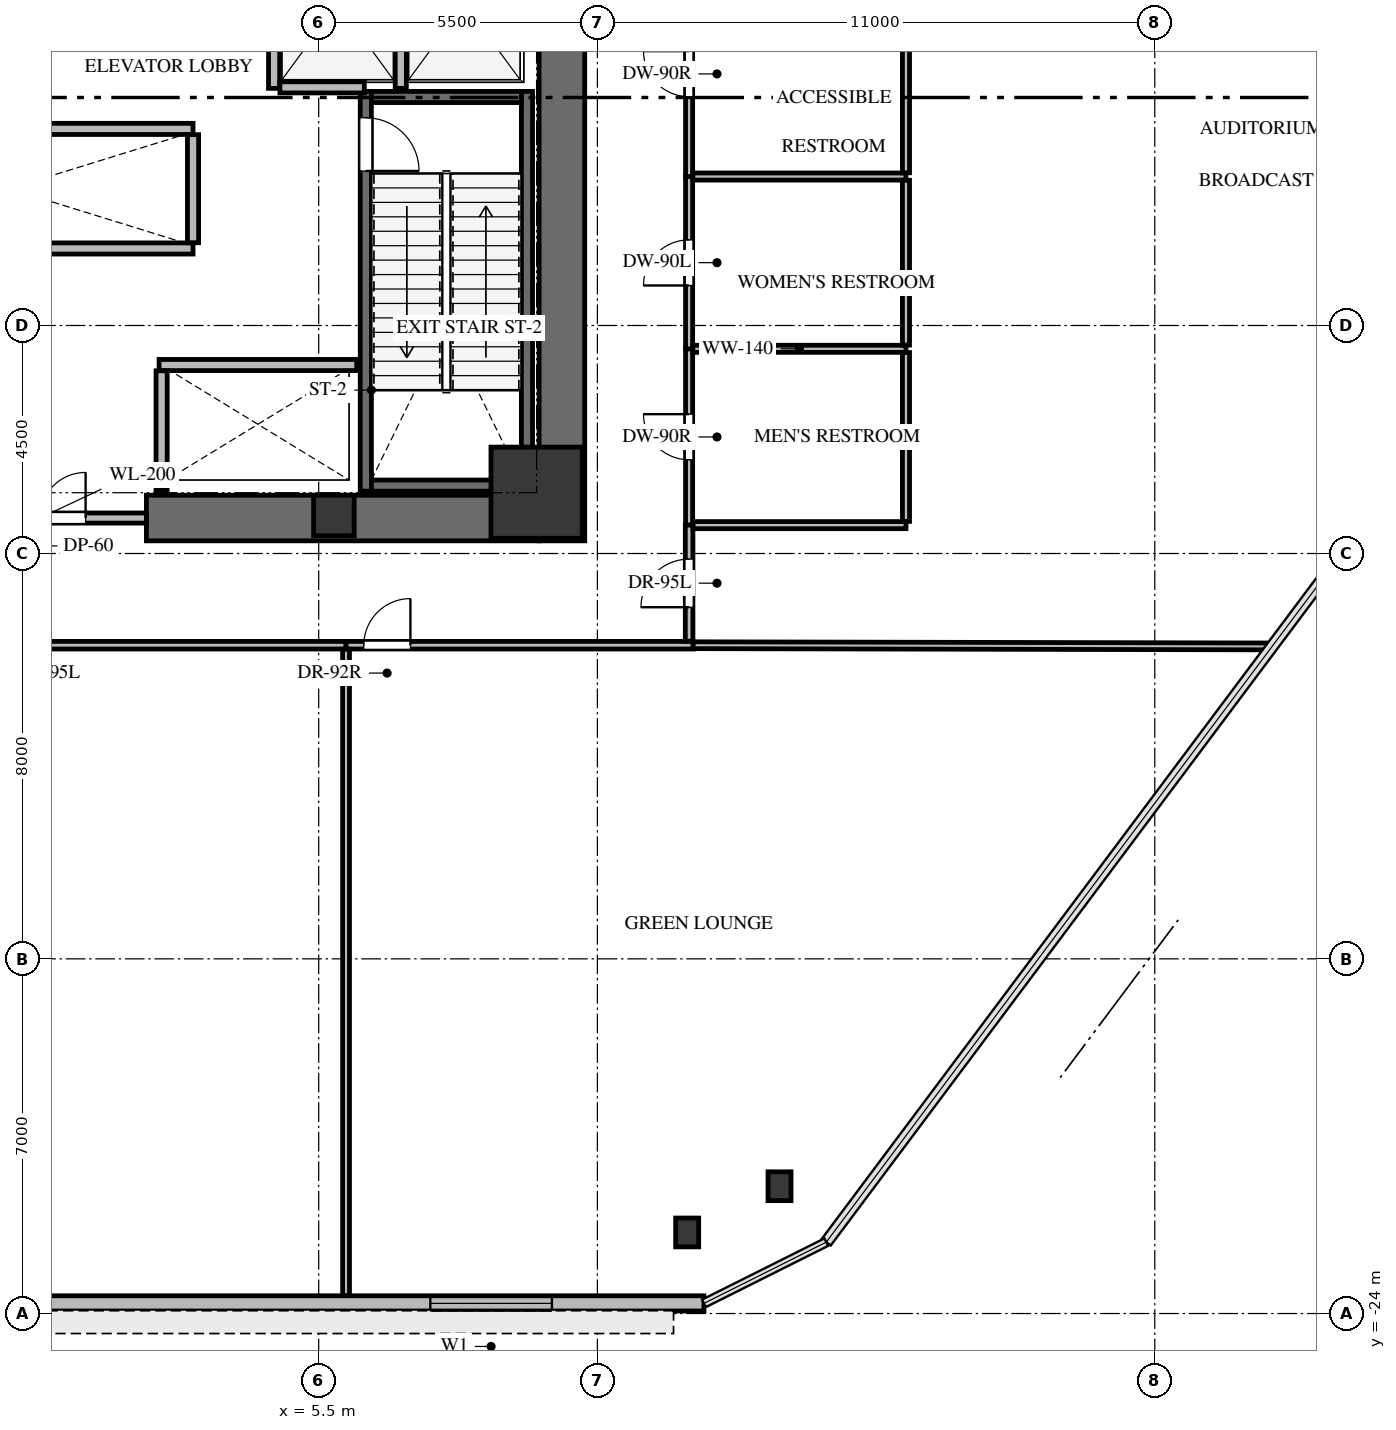
"""IFC4 building model, lengths in metres.
Left out: names, types, materials, properties, quantities, classifications, styles, units other than length and angle.
Written with IfcOpenShell. Run it as: python <this file> out.ifc"""

import sys

from ifc_helpers import new_model, si_unit, direction, frame, frame_2d, origin, origin_2d, place, context, subcontext, project, spatial, rectangle, i_section, extrude, source, transform, mapped, element, fill, save


model = new_model("IFC4")
c1 = context("Model", 3, precision=1e-05, world=origin(), true_north=direction((0.0, 1.0)))
c2 = subcontext(c1, "Body", "Model", "MODEL_VIEW")
j1 = project(units=[si_unit("LENGTHUNIT", "METRE"), si_unit("PLANEANGLEUNIT", "RADIAN")], contexts=[c1])
p1 = place(None, origin())
s1 = spatial("IfcSite", under=j1, at=p1, CompositionType="ELEMENT")
p2 = place(p1, origin())
s2 = spatial("IfcBuilding", under=s1, at=p2, CompositionType="ELEMENT")
p3 = place(p2, frame((0.0, 0.0, 15.6)))
s3 = spatial("IfcBuildingStorey", under=s2, at=p3, CompositionType="ELEMENT", Elevation=15.6)
p4 = place(p3, frame((10.3, -8.75, 0.0), z_axis=(0.0, 0.0, 1.0), x_axis=(0.0, 1.0, 0.0)))
e1 = element("IfcWall", 1, at=p4, inside=s3, PredefinedType="SHEAR", context=c2, shape_type="SweptSolid", body=[
    extrude(rectangle(XDim=17.5, YDim=0.9, at=frame_2d((8.75, 0.0))), origin(), (0.0, 0.0, 1.0), 5.6),
])
p5 = place(p3, frame((2.1, -8.3, 0.0), z_axis=(0.0, 0.0, 1.0), x_axis=(1.0, 0.0, 0.0)))
e2 = element("IfcWall", 2, at=p5, inside=s3, PredefinedType="SHEAR", context=c2, shape_type="SweptSolid", body=[
    extrude(rectangle(XDim=7.75, YDim=0.9, at=frame_2d((3.875, 0.0))), origin(), (0.0, 0.0, 1.0), 5.6),
])
p6 = place(p3, frame((9.61, -7.77, -0.32), z_axis=(0.0, 0.0, 1.0), x_axis=(0.0, 1.0, 0.0)))
e3 = element("IfcWall", 3, at=p6, inside=s3, PredefinedType="SHEAR", context=c2, shape_type="SweptSolid", body=[
    extrude(rectangle(XDim=7.89, YDim=0.22, at=frame_2d((3.945, 0.0))), origin(), (0.0, 0.0, 1.0), 5.6),
])
p7 = place(p3, frame((6.43, 0.12, -0.32), z_axis=(0.0, 0.0, 1.0), x_axis=(0.0, -1.0, 0.0)))
e4 = element("IfcWall", 4, at=p7, inside=s3, PredefinedType="SHEAR", context=c2, shape_type="SweptSolid", body=[
    extrude(rectangle(XDim=7.89, YDim=0.22, at=frame_2d((3.945, 0.0))), origin(), (0.0, 0.0, 1.0), 5.6),
])
p8 = place(p7, frame((0.52, 0.0, 0.0)))
e5 = element("IfcOpeningElement", 5, at=p8, cuts=e4, PredefinedType="OPENING", context=c2, shape_type="SweptSolid", body=[
    extrude(rectangle(XDim=1.05, YDim=2.15, at=frame_2d((0.525, 1.075))), frame((0.0, 0.12, 0.0), z_axis=(0.0, -1.0, 0.0), x_axis=(1.0, 0.0, 0.0)), (0.0, 0.0, 1.0), 0.24),
])
for number, where, z_axis, x_axis in (
    (6, (6.54, -7.66, -0.32), (0.0, 0.0, 1.0), (1.0, 0.0, 0.0)),
    (7, (9.5, 0.01, -0.32), (0.0, 0.0, 1.0), (-1.0, 0.0, 0.0)),
):
    element("IfcWall", number, at=place(p3, frame(where, z_axis=z_axis, x_axis=x_axis)), inside=s3, PredefinedType="SHEAR", context=c2, shape_type="SweptSolid", body=[
        extrude(rectangle(XDim=2.96, YDim=0.22, at=frame_2d((1.48, 0.0))), origin(), (0.0, 0.0, 1.0), 5.6),
    ])
m1 = source(origin(), c2, "Body", "SweptSolid", [
    extrude(rectangle(XDim=1.8, YDim=1.8, at=origin_2d()), origin(), (0.0, 0.0, 1.0), 5.6),
])
p9 = place(p3, frame((9.8, -7.8, -0.32), z_axis=(0.0, 0.0, 1.0), x_axis=(1.0, 0.0, 0.0)))
e8 = element("IfcColumn", 8, at=p9, inside=s3, PredefinedType="COLUMN", context=c2, shape_type="MappedRepresentation", body=[
    mapped(m1, transform((0.0, 0.0, 0.0), x_axis=(1.0, 0.0, 0.0), y_axis=(0.0, 1.0, 0.0), z_axis=(0.0, 0.0, 1.0), scale=1.0)),
])
m2 = source(origin(), c2, "Body", "SweptSolid", [
    extrude(rectangle(XDim=0.8, YDim=0.8, at=origin_2d()), origin(), (0.0, 0.0, 1.0), 5.6),
])
p10 = place(p3, frame((5.8, -8.25, -0.32), z_axis=(0.0, 0.0, 1.0), x_axis=(1.0, 0.0, 0.0)))
e9 = element("IfcColumn", 9, at=p10, inside=s3, PredefinedType="PILASTER", context=c2, shape_type="MappedRepresentation", body=[
    mapped(m2, transform((0.0, 0.0, 0.0), x_axis=(1.0, 0.0, 0.0), y_axis=(0.0, 1.0, 0.0), z_axis=(0.0, 0.0, 1.0), scale=1.0)),
])
m3 = source(origin(), c2, "Body", "SweptSolid", [
    extrude(i_section(OverallWidth=0.454, OverallDepth=0.569, WebThickness=0.078, FlangeThickness=0.125, FilletRadius=0.031, at=origin_2d()), origin(), (0.0, 0.0, 1.0), 5.6),
])
for number, where, z_axis, x_axis in (
    (10, (14.594, -21.488, -0.32), (0.0, 0.0, 1.0), (1.0, 0.0, 0.0)),
    (11, (12.772, -22.4, -0.32), (0.0, 0.0, 1.0), (1.0, 0.0, 0.0)),
):
    element("IfcColumn", number, at=place(p3, frame(where, z_axis=z_axis, x_axis=x_axis)), inside=s3, PredefinedType="COLUMN", context=c2, shape_type="MappedRepresentation", body=[
        mapped(m3, transform((0.0, 0.0, 0.0), x_axis=(1.0, 0.0, 0.0), y_axis=(0.0, 1.0, 0.0), z_axis=(0.0, 0.0, 1.0), scale=1.0)),
    ])
p11 = place(p3, frame((13.103, -23.8, 0.0), z_axis=(0.0, 0.0, 1.0), x_axis=(-1.0, 0.0, 0.0)))
e12 = element("IfcWall", 12, at=p11, inside=s3, PredefinedType="SOLIDWALL", context=c2, shape_type="SweptSolid", body=[
    extrude(rectangle(XDim=27.578, YDim=0.3, at=frame_2d((13.789, 0.0))), origin(), (0.0, 0.0, 1.0), 5.28),
])
p12 = place(p11, frame((3.0, 0.0, 1.0)))
e13 = element("IfcOpeningElement", 13, at=p12, cuts=e12, PredefinedType="OPENING", context=c2, shape_type="SweptSolid", body=[
    extrude(rectangle(XDim=2.4, YDim=2.1, at=frame_2d((1.2, 1.05))), frame((0.0, 0.16, 0.0), z_axis=(0.0, -1.0, 0.0), x_axis=(1.0, 0.0, 0.0)), (0.0, 0.0, 1.0), 0.32),
])
p13 = place(p11, frame((22.178, 0.0, 1.0)))
e14 = element("IfcOpeningElement", 14, at=p13, cuts=e12, PredefinedType="OPENING", context=c2, shape_type="SweptSolid", body=[
    extrude(rectangle(XDim=2.4, YDim=2.1, at=frame_2d((1.2, 1.05))), frame((0.0, 0.16, 0.0), z_axis=(0.0, -1.0, 0.0), x_axis=(1.0, 0.0, 0.0)), (0.0, 0.0, 1.0), 0.32),
])
p14 = place(p3, frame((-2.1, -8.3, 0.0), z_axis=(0.0, 0.0, 1.0), x_axis=(1.0, 0.0, 0.0)))
e15 = element("IfcWall", 15, at=p14, inside=s3, PredefinedType="SOLIDWALL", context=c2, shape_type="SweptSolid", body=[
    extrude(rectangle(XDim=4.2, YDim=0.2, at=frame_2d((2.1, 0.0))), origin(), (0.0, 0.0, 1.0), 5.265),
])
p15 = place(p14, frame((1.2, 0.0, 0.0)))
e16 = element("IfcOpeningElement", 16, at=p15, cuts=e15, PredefinedType="OPENING", context=c2, shape_type="SweptSolid", body=[
    extrude(rectangle(XDim=1.8, YDim=2.15, at=frame_2d((0.9, 1.075))), frame((0.0, 0.11, 0.0), z_axis=(0.0, -1.0, 0.0), x_axis=(1.0, 0.0, 0.0)), (0.0, 0.0, 1.0), 0.22),
])
for number, where, z_axis, x_axis in (
    (17, (4.62, 0.18, 0.0), (0.0, 0.0, 1.0), (0.0, 1.0, 0.0)),
    (18, (7.12, 0.18, 0.0), (0.0, 0.0, 1.0), (0.0, 1.0, 0.0)),
):
    element("IfcWall", number, at=place(p3, frame(where, z_axis=z_axis, x_axis=x_axis)), inside=s3, PredefinedType="SOLIDWALL", context=c2, shape_type="SweptSolid", body=[
        extrude(rectangle(XDim=3.186, YDim=0.22, at=frame_2d((1.593, 0.0))), origin(), (0.0, 0.0, 1.0), 5.265),
    ])
p16 = place(p3, frame((4.734, 0.2, 0.0), z_axis=(0.0, 0.0, 1.0), x_axis=(1.0, 0.0, 0.0)))
e19 = element("IfcWall", 19, at=p16, inside=s3, PredefinedType="SOLIDWALL", context=c2, shape_type="SweptSolid", body=[
    extrude(rectangle(XDim=1.666, YDim=0.22, at=frame_2d((0.833, 0.0))), origin(), (0.0, 0.0, 1.0), 5.265),
])
p17 = place(p3, frame((2.35, -5.28, 0.0), z_axis=(0.0, 0.0, 1.0), x_axis=(1.0, 0.0, 0.0)))
e20 = element("IfcWall", 20, at=p17, inside=s3, PredefinedType="SOLIDWALL", context=c2, shape_type="SweptSolid", body=[
    extrude(rectangle(XDim=3.9, YDim=0.22, at=frame_2d((1.95, 0.0))), origin(), (0.0, 0.0, 1.0), 5.265),
])
p18 = place(p3, frame((2.4, -7.75, 0.0), z_axis=(0.0, 0.0, 1.0), x_axis=(0.0, 1.0, 0.0)))
e21 = element("IfcWall", 21, at=p18, inside=s3, PredefinedType="SOLIDWALL", context=c2, shape_type="SweptSolid", body=[
    extrude(rectangle(XDim=2.356, YDim=0.22, at=frame_2d((1.178, 0.0))), origin(), (0.0, 0.0, 1.0), 5.265),
])
for number, where, z_axis, x_axis in (
    (22, (-4.22, -2.98, 0.0), (0.0, 0.0, 1.0), (1.0, 0.0, 0.0)),
    (23, (-4.22, -0.62, 0.0), (0.0, 0.0, 1.0), (1.0, 0.0, 0.0)),
):
    element("IfcWall", number, at=place(p3, frame(where, z_axis=z_axis, x_axis=x_axis)), inside=s3, PredefinedType="SOLIDWALL", context=c2, shape_type="SweptSolid", body=[
        extrude(rectangle(XDim=7.24, YDim=0.22, at=frame_2d((3.62, 0.0))), origin(), (0.0, 0.0, 1.0), 5.265),
    ])
p19 = place(p3, frame((3.02, -2.866, 0.0), z_axis=(0.0, 0.0, 1.0), x_axis=(0.0, 1.0, 0.0)))
e24 = element("IfcWall", 24, at=p19, inside=s3, PredefinedType="SOLIDWALL", context=c2, shape_type="SweptSolid", body=[
    extrude(rectangle(XDim=2.132, YDim=0.22, at=frame_2d((1.066, 0.0))), origin(), (0.0, 0.0, 1.0), 5.265),
])
p20 = place(p3, frame((12.81, -8.44, 0.0), z_axis=(0.0, 0.0, 1.0), x_axis=(0.0, 1.0, 0.0)))
e25 = element("IfcWall", 25, at=p20, inside=s3, PredefinedType="PARTITIONING", context=c2, shape_type="SweptSolid", body=[
    extrude(rectangle(XDim=3.48, YDim=0.14, at=frame_2d((1.74, 0.0))), origin(), (0.0, 0.0, 1.0), 5.265),
])
p21 = place(p20, frame((1.29, 0.0, 0.0)))
e26 = element("IfcOpeningElement", 26, at=p21, cuts=e25, PredefinedType="OPENING", context=c2, shape_type="SweptSolid", body=[
    extrude(rectangle(XDim=0.9, YDim=2.05, at=frame_2d((0.45, 1.025))), frame((0.0, 0.08, 0.0), z_axis=(0.0, -1.0, 0.0), x_axis=(1.0, 0.0, 0.0)), (0.0, 0.0, 1.0), 0.16),
])
p22 = place(p3, frame((12.81, -4.96, 0.0), z_axis=(0.0, 0.0, 1.0), x_axis=(0.0, 1.0, 0.0)))
e27 = element("IfcWall", 27, at=p22, inside=s3, PredefinedType="PARTITIONING", context=c2, shape_type="SweptSolid", body=[
    extrude(rectangle(XDim=3.4, YDim=0.14, at=frame_2d((1.7, 0.0))), origin(), (0.0, 0.0, 1.0), 4.284),
])
p23 = place(p22, frame((1.25, 0.0, 0.0)))
e28 = element("IfcOpeningElement", 28, at=p23, cuts=e27, PredefinedType="OPENING", context=c2, shape_type="SweptSolid", body=[
    extrude(rectangle(XDim=0.9, YDim=2.05, at=frame_2d((0.45, 1.025))), frame((0.0, 0.08, 0.0), z_axis=(0.0, -1.0, 0.0), x_axis=(1.0, 0.0, 0.0)), (0.0, 0.0, 1.0), 0.16),
])
p24 = place(p3, frame((12.81, -1.56, 0.0), z_axis=(0.0, 0.0, 1.0), x_axis=(0.0, 1.0, 0.0)))
e29 = element("IfcWall", 29, at=p24, inside=s3, PredefinedType="PARTITIONING", context=c2, shape_type="SweptSolid", body=[
    extrude(rectangle(XDim=4.05, YDim=0.14, at=frame_2d((2.025, 0.0))), origin(), (0.0, 0.0, 1.0), 4.284),
])
p25 = place(p24, frame((1.575, 0.0, 0.0)))
e30 = element("IfcOpeningElement", 30, at=p25, cuts=e29, PredefinedType="OPENING", context=c2, shape_type="SweptSolid", body=[
    extrude(rectangle(XDim=0.9, YDim=2.05, at=frame_2d((0.45, 1.025))), frame((0.0, 0.08, 0.0), z_axis=(0.0, -1.0, 0.0), x_axis=(1.0, 0.0, 0.0)), (0.0, 0.0, 1.0), 0.16),
])
p26 = place(p3, frame((-7.96, -10.81, 0.0), z_axis=(0.0, 0.0, 1.0), x_axis=(1.0, 0.0, 0.0)))
e31 = element("IfcWall", 31, at=p26, inside=s3, PredefinedType="PARTITIONING", context=c2, shape_type="SweptSolid", body=[
    extrude(rectangle(XDim=14.0, YDim=0.15, at=frame_2d((7.0, 0.0))), origin(), (0.0, 0.0, 1.0), 4.284),
])
p27 = place(p26, frame((6.525, 0.0, 0.0)))
e32 = element("IfcOpeningElement", 32, at=p27, cuts=e31, PredefinedType="OPENING", context=c2, shape_type="SweptSolid", body=[
    extrude(rectangle(XDim=0.95, YDim=2.1, at=frame_2d((0.475, 1.05))), frame((0.0, 0.085, 0.0), z_axis=(0.0, -1.0, 0.0), x_axis=(1.0, 0.0, 0.0)), (0.0, 0.0, 1.0), 0.17),
])
p28 = place(p3, frame((6.04, -10.81, 0.0), z_axis=(0.0, 0.0, 1.0), x_axis=(1.0, 0.0, 0.0)))
e33 = element("IfcWall", 33, at=p28, inside=s3, PredefinedType="PARTITIONING", context=c2, shape_type="SweptSolid", body=[
    extrude(rectangle(XDim=6.85, YDim=0.15, at=frame_2d((3.425, 0.0))), origin(), (0.0, 0.0, 1.0), 5.265),
])
p29 = place(p28, frame((0.35, 0.0, 0.0)))
e34 = element("IfcOpeningElement", 34, at=p29, cuts=e33, PredefinedType="OPENING", context=c2, shape_type="SweptSolid", body=[
    extrude(rectangle(XDim=0.92, YDim=2.1, at=frame_2d((0.46, 1.05))), frame((0.0, 0.085, 0.0), z_axis=(0.0, -1.0, 0.0), x_axis=(1.0, 0.0, 0.0)), (0.0, 0.0, 1.0), 0.17),
])
p30 = place(p3, frame((12.81, -10.731, 0.0), z_axis=(0.0, 0.0, 1.0), x_axis=(0.0, 1.0, 0.0)))
e35 = element("IfcWall", 35, at=p30, inside=s3, PredefinedType="PARTITIONING", context=c2, shape_type="SweptSolid", body=[
    extrude(rectangle(XDim=2.291, YDim=0.15, at=frame_2d((1.146, 0.0))), origin(), (0.0, 0.0, 1.0), 5.265),
])
p31 = place(p30, frame((0.67, 0.0, 0.0)))
e36 = element("IfcOpeningElement", 36, at=p31, cuts=e35, PredefinedType="OPENING", context=c2, shape_type="SweptSolid", body=[
    extrude(rectangle(XDim=0.95, YDim=2.1, at=frame_2d((0.475, 1.05))), frame((0.0, 0.085, 0.0), z_axis=(0.0, -1.0, 0.0), x_axis=(1.0, 0.0, 0.0)), (0.0, 0.0, 1.0), 0.17),
])
p32 = place(p3, frame((12.884, -4.96, 0.0), z_axis=(0.0, 0.0, 1.0), x_axis=(1.0, 0.0, 0.0)))
e37 = element("IfcWall", 37, at=p32, inside=s3, PredefinedType="PARTITIONING", context=c2, shape_type="SweptSolid", body=[
    extrude(rectangle(XDim=4.206, YDim=0.14, at=frame_2d((2.103, 0.0))), origin(), (0.0, 0.0, 1.0), 5.265),
])
p33 = place(p3, frame((17.09, -8.44, 0.0), z_axis=(0.0, 0.0, 1.0), x_axis=(-1.0, 0.0, 0.0)))
e38 = element("IfcWall", 38, at=p33, inside=s3, PredefinedType="PARTITIONING", context=c2, shape_type="SweptSolid", body=[
    extrude(rectangle(XDim=4.201, YDim=0.14, at=frame_2d((2.101, 0.0))), origin(), (0.0, 0.0, 1.0), 5.265),
])
p34 = place(p3, frame((17.09, -5.034, 0.0), z_axis=(0.0, 0.0, 1.0), x_axis=(0.0, -1.0, 0.0)))
e39 = element("IfcWall", 39, at=p34, inside=s3, PredefinedType="PARTITIONING", context=c2, shape_type="SweptSolid", body=[
    extrude(rectangle(XDim=3.332, YDim=0.14, at=frame_2d((1.666, 0.0))), origin(), (0.0, 0.0, 1.0), 5.265),
])
p35 = place(p3, frame((12.884, -1.56, 0.0), z_axis=(0.0, 0.0, 1.0), x_axis=(1.0, 0.0, 0.0)))
e40 = element("IfcWall", 40, at=p35, inside=s3, PredefinedType="PARTITIONING", context=c2, shape_type="SweptSolid", body=[
    extrude(rectangle(XDim=4.206, YDim=0.14, at=frame_2d((2.103, 0.0))), origin(), (0.0, 0.0, 1.0), 5.265),
])
p36 = place(p3, frame((17.09, -1.634, 0.0), z_axis=(0.0, 0.0, 1.0), x_axis=(0.0, -1.0, 0.0)))
e41 = element("IfcWall", 41, at=p36, inside=s3, PredefinedType="PARTITIONING", context=c2, shape_type="SweptSolid", body=[
    extrude(rectangle(XDim=3.252, YDim=0.14, at=frame_2d((1.626, 0.0))), origin(), (0.0, 0.0, 1.0), 4.284),
])
p37 = place(p3, frame((17.09, 2.416, 0.0), z_axis=(0.0, 0.0, 1.0), x_axis=(0.0, -1.0, 0.0)))
e42 = element("IfcWall", 42, at=p37, inside=s3, PredefinedType="PARTITIONING", context=c2, shape_type="SweptSolid", body=[
    extrude(rectangle(XDim=3.902, YDim=0.14, at=frame_2d((1.951, 0.0))), origin(), (0.0, 0.0, 1.0), 4.284),
])
p38 = place(p3, frame((6.04, -10.889, 0.0), z_axis=(0.0, 0.0, 1.0), x_axis=(0.0, -1.0, 0.0)))
e43 = element("IfcWall", 43, at=p38, inside=s3, PredefinedType="PARTITIONING", context=c2, shape_type="SweptSolid", body=[
    extrude(rectangle(XDim=12.756, YDim=0.135, at=frame_2d((6.378, 0.0))), origin(), (0.0, 0.0, 1.0), 4.284),
])
p39 = place(p3, frame((12.89, -10.81, 0.0), z_axis=(0.0, 0.0, 1.0), x_axis=(0.999997852069, -0.002072645121, 0.0)))
e44 = element("IfcWall", 44, at=p39, inside=s3, PredefinedType="PARTITIONING", context=c2, shape_type="SweptSolid", body=[
    extrude(rectangle(XDim=11.426, YDim=0.135, at=frame_2d((5.713, 0.0))), origin(), (0.0, 0.0, 1.0), 4.574),
])
m4 = source(origin(), c2, "Body", "SweptSolid", [
    extrude(rectangle(XDim=2.4, YDim=2.1, at=frame_2d((1.2, 1.05))), frame((0.0, 0.03, 0.0), z_axis=(0.0, -1.0, 0.0), x_axis=(1.0, 0.0, 0.0)), (0.0, 0.0, 1.0), 0.06),
])
p40 = place(p12, origin())
e45 = element("IfcWindow", 45, at=p40, inside=s3, PartitioningType="SINGLE_PANEL", PredefinedType="WINDOW", context=c2, shape_type="MappedRepresentation", body=[
    mapped(m4, transform((0.0, 0.0, 0.0), x_axis=(1.0, 0.0, 0.0), y_axis=(0.0, 1.0, 0.0), z_axis=(0.0, 0.0, 1.0), scale=1.0)),
])
fill(e13, e45)
m5 = source(origin(), c2, "Body", "SweptSolid", [
    extrude(rectangle(XDim=1.05, YDim=2.15, at=frame_2d((0.525, 1.075))), frame((0.0, 0.025, 0.0), z_axis=(0.0, -1.0, 0.0), x_axis=(1.0, 0.0, 0.0)), (0.0, 0.0, 1.0), 0.05),
])
p41 = place(p8, origin())
e46 = element("IfcDoor", 46, at=p41, inside=s3, OperationType="SINGLE_SWING_RIGHT", PredefinedType="DOOR", context=c2, shape_type="MappedRepresentation", body=[
    mapped(m5, transform((0.0, 0.0, 0.0), x_axis=(1.0, 0.0, 0.0), y_axis=(0.0, 1.0, 0.0), z_axis=(0.0, 0.0, 1.0), scale=1.0)),
])
fill(e5, e46)
m6 = source(origin(), c2, "Body", "SweptSolid", [
    extrude(rectangle(XDim=1.8, YDim=2.15, at=frame_2d((0.9, 1.075))), frame((0.0, 0.025, 0.0), z_axis=(0.0, -1.0, 0.0), x_axis=(1.0, 0.0, 0.0)), (0.0, 0.0, 1.0), 0.05),
])
p42 = place(p15, origin())
e47 = element("IfcDoor", 47, at=p42, inside=s3, OperationType="DOUBLE_DOOR_SINGLE_SWING", PredefinedType="DOOR", context=c2, shape_type="MappedRepresentation", body=[
    mapped(m6, transform((0.0, 0.0, 0.0), x_axis=(1.0, 0.0, 0.0), y_axis=(0.0, 1.0, 0.0), z_axis=(0.0, 0.0, 1.0), scale=1.0)),
])
fill(e16, e47)
m7 = source(origin(), c2, "Body", "SweptSolid", [
    extrude(rectangle(XDim=0.9, YDim=2.05, at=frame_2d((0.45, 1.025))), frame((0.0, 0.025, 0.0), z_axis=(0.0, -1.0, 0.0), x_axis=(1.0, 0.0, 0.0)), (0.0, 0.0, 1.0), 0.05),
])
p43 = place(p21, origin())
e48 = element("IfcDoor", 48, at=p43, inside=s3, OperationType="SINGLE_SWING_RIGHT", PredefinedType="DOOR", context=c2, shape_type="MappedRepresentation", body=[
    mapped(m7, transform((0.0, 0.0, 0.0), x_axis=(1.0, 0.0, 0.0), y_axis=(0.0, 1.0, 0.0), z_axis=(0.0, 0.0, 1.0), scale=1.0)),
])
fill(e26, e48)
m8 = source(origin(), c2, "Body", "SweptSolid", [
    extrude(rectangle(XDim=0.9, YDim=2.05, at=frame_2d((0.45, 1.025))), frame((0.0, 0.025, 0.0), z_axis=(0.0, -1.0, 0.0), x_axis=(1.0, 0.0, 0.0)), (0.0, 0.0, 1.0), 0.05),
])
p44 = place(p23, origin())
e49 = element("IfcDoor", 49, at=p44, inside=s3, OperationType="SINGLE_SWING_LEFT", PredefinedType="DOOR", context=c2, shape_type="MappedRepresentation", body=[
    mapped(m8, transform((0.0, 0.0, 0.0), x_axis=(1.0, 0.0, 0.0), y_axis=(0.0, 1.0, 0.0), z_axis=(0.0, 0.0, 1.0), scale=1.0)),
])
fill(e28, e49)
p45 = place(p25, origin())
e50 = element("IfcDoor", 50, at=p45, inside=s3, OperationType="SINGLE_SWING_RIGHT", PredefinedType="DOOR", context=c2, shape_type="MappedRepresentation", body=[
    mapped(m7, transform((0.0, 0.0, 0.0), x_axis=(1.0, 0.0, 0.0), y_axis=(0.0, 1.0, 0.0), z_axis=(0.0, 0.0, 1.0), scale=1.0)),
])
fill(e30, e50)
m9 = source(origin(), c2, "Body", "SweptSolid", [
    extrude(rectangle(XDim=0.92, YDim=2.1, at=frame_2d((0.46, 1.05))), frame((0.0, 0.025, 0.0), z_axis=(0.0, -1.0, 0.0), x_axis=(1.0, 0.0, 0.0)), (0.0, 0.0, 1.0), 0.05),
])
p46 = place(p29, origin())
e51 = element("IfcDoor", 51, at=p46, inside=s3, OperationType="SINGLE_SWING_RIGHT", PredefinedType="DOOR", context=c2, shape_type="MappedRepresentation", body=[
    mapped(m9, transform((0.0, 0.0, 0.0), x_axis=(1.0, 0.0, 0.0), y_axis=(0.0, 1.0, 0.0), z_axis=(0.0, 0.0, 1.0), scale=1.0)),
])
fill(e34, e51)
m10 = source(origin(), c2, "Body", "SweptSolid", [
    extrude(rectangle(XDim=0.95, YDim=2.1, at=frame_2d((0.475, 1.05))), frame((0.0, 0.025, 0.0), z_axis=(0.0, -1.0, 0.0), x_axis=(1.0, 0.0, 0.0)), (0.0, 0.0, 1.0), 0.05),
])
p47 = place(p31, origin())
e52 = element("IfcDoor", 52, at=p47, inside=s3, OperationType="SINGLE_SWING_LEFT", PredefinedType="DOOR", context=c2, shape_type="MappedRepresentation", body=[
    mapped(m10, transform((0.0, 0.0, 0.0), x_axis=(1.0, 0.0, 0.0), y_axis=(0.0, 1.0, 0.0), z_axis=(0.0, 0.0, 1.0), scale=1.0)),
])
fill(e36, e52)
save(model, sys.argv[1])
